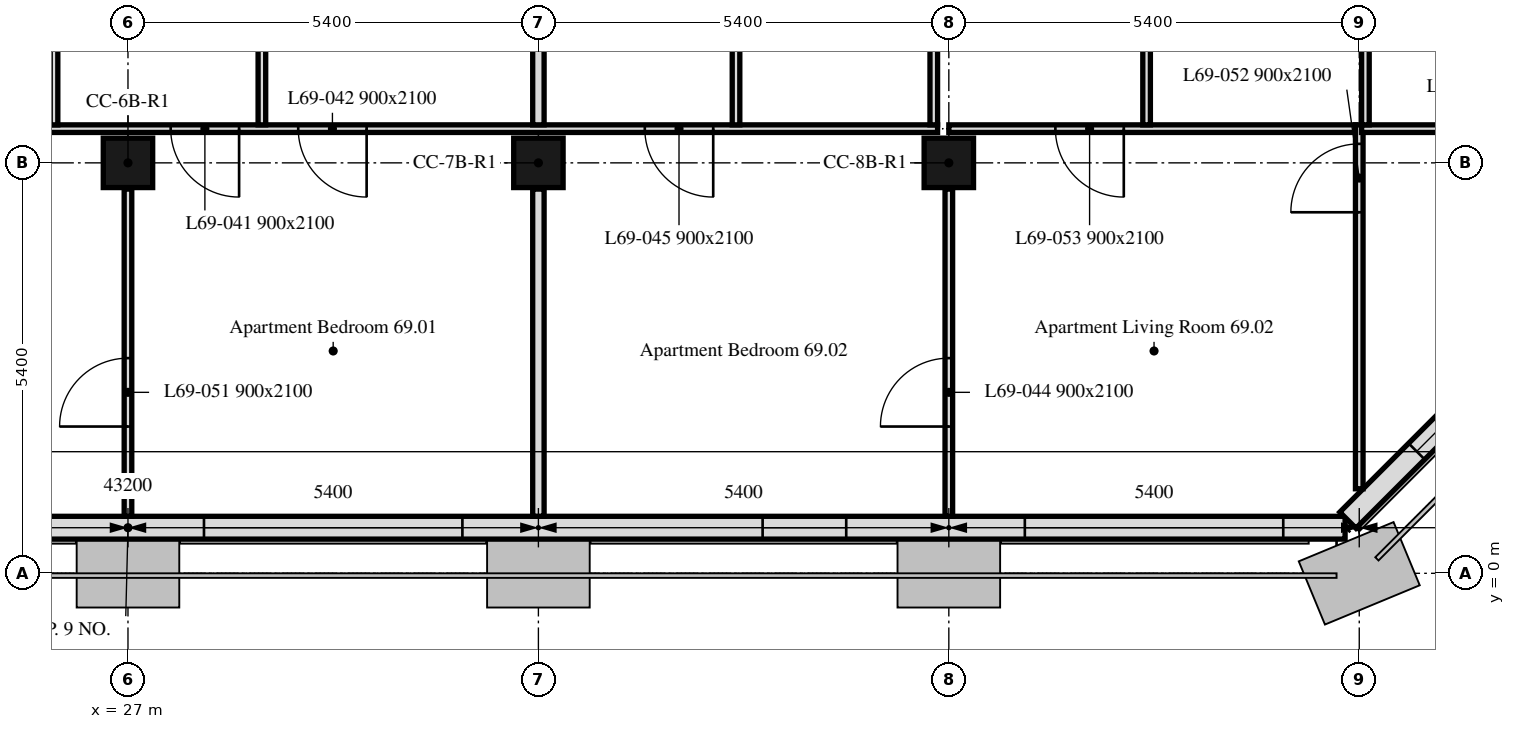
"""IFC4 building model, lengths in metres.
Left out: names, types, materials, properties, quantities, classifications, styles, units other than length and angle.
Written with IfcOpenShell. Run it as: python <this file> out.ifc"""

import sys

from ifc_helpers import new_model, si_unit, direction, frame, frame_2d, origin, origin_2d, place, context, subcontext, project, spatial, rectangle, extrude, element, fill, save


model = new_model("IFC4")
c1 = context("Model", 3, precision=1e-05, world=origin(), true_north=direction((0.0, 1.0)))
c2 = subcontext(c1, "Body", "Model", "MODEL_VIEW")
j1 = project(units=[si_unit("LENGTHUNIT", "METRE"), si_unit("PLANEANGLEUNIT", "RADIAN")], contexts=[c1])
p1 = place(None, origin())
s1 = spatial("IfcSite", under=j1, at=p1, CompositionType="ELEMENT")
p2 = place(p1, origin())
s2 = spatial("IfcBuilding", under=s1, at=p2, CompositionType="ELEMENT")
p3 = place(p2, frame((0.0, 0.0, 281.8)))
s3 = spatial("IfcBuildingStorey", under=s2, at=p3, CompositionType="ELEMENT", Elevation=281.8)
for number, where, z_axis, x_axis in (
    (1, (27.0, 5.4, 0.0), (0.0, 0.0, 1.0), (1.0, 0.0, 0.0)),
    (2, (32.4, 5.4, 0.0), (0.0, 0.0, 1.0), (1.0, 0.0, 0.0)),
    (3, (37.8, 5.4, 0.0), (0.0, 0.0, 1.0), (1.0, 0.0, 0.0)),
):
    element("IfcColumn", number, at=place(p3, frame(where, z_axis=z_axis, x_axis=x_axis)), inside=s3, PredefinedType="COLUMN", context=c2, shape_type="SweptSolid", body=[
        extrude(rectangle(XDim=0.65, YDim=0.65, at=origin_2d()), origin(), (0.0, 0.0, 1.0), 3.0),
    ])
p4 = place(p3, frame((10.986, 0.6, 0.0), z_axis=(0.0, 0.0, 1.0), x_axis=(1.0, 0.0, 0.0)))
e4 = element("IfcWall", 4, at=p4, inside=s3, PredefinedType="SOLIDWALL", context=c2, shape_type="SweptSolid", body=[
    extrude(rectangle(XDim=32.027, YDim=0.3, at=frame_2d((16.014, 0.0))), origin(), (0.0, 0.0, 1.0), 3.0),
])
p5 = place(p4, frame((2.764, 0.0, 0.9)))
e5 = element("IfcOpeningElement", 5, at=p5, cuts=e4, PredefinedType="OPENING", context=c2, shape_type="SweptSolid", body=[
    extrude(rectangle(XDim=1.1, YDim=1.7, at=frame_2d((0.55, 0.85))), frame((0.0, 0.16, 0.0), z_axis=(0.0, -1.0, 0.0), x_axis=(1.0, 0.0, 0.0)), (0.0, 0.0, 1.0), 0.32),
])
p6 = place(p4, frame((6.214, 0.0, 0.9)))
e6 = element("IfcOpeningElement", 6, at=p6, cuts=e4, PredefinedType="OPENING", context=c2, shape_type="SweptSolid", body=[
    extrude(rectangle(XDim=3.4, YDim=1.7, at=frame_2d((1.7, 0.85))), frame((0.0, 0.16, 0.0), z_axis=(0.0, -1.0, 0.0), x_axis=(1.0, 0.0, 0.0)), (0.0, 0.0, 1.0), 0.32),
])
p7 = place(p4, frame((13.564, 0.0, 0.9)))
e7 = element("IfcOpeningElement", 7, at=p7, cuts=e4, PredefinedType="OPENING", context=c2, shape_type="SweptSolid", body=[
    extrude(rectangle(XDim=1.1, YDim=1.7, at=frame_2d((0.55, 0.85))), frame((0.0, 0.16, 0.0), z_axis=(0.0, -1.0, 0.0), x_axis=(1.0, 0.0, 0.0)), (0.0, 0.0, 1.0), 0.32),
])
p8 = place(p4, frame((17.014, 0.0, 0.9)))
e8 = element("IfcOpeningElement", 8, at=p8, cuts=e4, PredefinedType="OPENING", context=c2, shape_type="SweptSolid", body=[
    extrude(rectangle(XDim=3.4, YDim=1.7, at=frame_2d((1.7, 0.85))), frame((0.0, 0.16, 0.0), z_axis=(0.0, -1.0, 0.0), x_axis=(1.0, 0.0, 0.0)), (0.0, 0.0, 1.0), 0.32),
])
p9 = place(p4, frame((24.364, 0.0, 0.9)))
e9 = element("IfcOpeningElement", 9, at=p9, cuts=e4, PredefinedType="OPENING", context=c2, shape_type="SweptSolid", body=[
    extrude(rectangle(XDim=1.1, YDim=1.7, at=frame_2d((0.55, 0.85))), frame((0.0, 0.16, 0.0), z_axis=(0.0, -1.0, 0.0), x_axis=(1.0, 0.0, 0.0)), (0.0, 0.0, 1.0), 0.32),
])
p10 = place(p4, frame((27.814, 0.0, 0.9)))
e10 = element("IfcOpeningElement", 10, at=p10, cuts=e4, PredefinedType="OPENING", context=c2, shape_type="SweptSolid", body=[
    extrude(rectangle(XDim=3.4, YDim=1.7, at=frame_2d((1.7, 0.85))), frame((0.0, 0.16, 0.0), z_axis=(0.0, -1.0, 0.0), x_axis=(1.0, 0.0, 0.0)), (0.0, 0.0, 1.0), 0.32),
])
p11 = place(p3, frame((43.051, 0.699, 0.0), z_axis=(0.0, 0.0, 1.0), x_axis=(0.707106781187, 0.707106781187, 0.0)))
e11 = element("IfcWall", 11, at=p11, inside=s3, PredefinedType="SOLIDWALL", context=c2, shape_type="SweptSolid", body=[
    extrude(rectangle(XDim=6.86, YDim=0.3, at=frame_2d((3.43, 0.0))), origin(), (0.0, 0.0, 1.0), 3.0),
])
p12 = place(p11, frame((1.28, 0.0, 0.9)))
e12 = element("IfcOpeningElement", 12, at=p12, cuts=e11, PredefinedType="OPENING", context=c2, shape_type="SweptSolid", body=[
    extrude(rectangle(XDim=1.1, YDim=1.7, at=frame_2d((0.55, 0.85))), frame((0.0, 0.16, 0.0), z_axis=(0.0, -1.0, 0.0), x_axis=(1.0, 0.0, 0.0)), (0.0, 0.0, 1.0), 0.32),
])
p13 = place(p11, frame((4.48, 0.0, 0.9)))
e13 = element("IfcOpeningElement", 13, at=p13, cuts=e11, PredefinedType="OPENING", context=c2, shape_type="SweptSolid", body=[
    extrude(rectangle(XDim=1.1, YDim=1.7, at=frame_2d((0.55, 0.85))), frame((0.0, 0.16, 0.0), z_axis=(0.0, -1.0, 0.0), x_axis=(1.0, 0.0, 0.0)), (0.0, 0.0, 1.0), 0.32),
])
p14 = place(p3, frame((37.652, 5.85, 0.0), z_axis=(0.0, 0.0, 1.0), x_axis=(-1.0, 0.0, 0.0)))
e14 = element("IfcWall", 14, at=p14, inside=s3, PredefinedType="PARTITIONING", context=c2, shape_type="SweptSolid", body=[
    extrude(rectangle(XDim=31.501, YDim=0.1, at=frame_2d((15.75, 0.0))), origin(), (0.0, 0.0, 1.0), 2.4),
])
p15 = place(p14, frame((12.923, 0.0, 0.0)))
e15 = element("IfcOpeningElement", 15, at=p15, cuts=e14, PredefinedType="OPENING", context=c2, shape_type="SweptSolid", body=[
    extrude(rectangle(XDim=0.9, YDim=2.1, at=frame_2d((0.45, 1.05))), frame((0.0, 0.05, 0.0), z_axis=(0.0, -1.0, 0.0), x_axis=(1.0, 0.0, 0.0)), (0.0, 0.0, 1.0), 0.1),
])
p16 = place(p14, frame((29.422, 0.0, 0.0)))
e16 = element("IfcOpeningElement", 16, at=p16, cuts=e14, PredefinedType="OPENING", context=c2, shape_type="SweptSolid", body=[
    extrude(rectangle(XDim=0.9, YDim=2.1, at=frame_2d((0.45, 1.05))), frame((0.0, 0.05, 0.0), z_axis=(0.0, -1.0, 0.0), x_axis=(1.0, 0.0, 0.0)), (0.0, 0.0, 1.0), 0.1),
])
p17 = place(p14, frame((28.182, 0.0, 0.0)))
e17 = element("IfcOpeningElement", 17, at=p17, cuts=e14, PredefinedType="OPENING", context=c2, shape_type="SweptSolid", body=[
    extrude(rectangle(XDim=0.9, YDim=2.1, at=frame_2d((0.45, 1.05))), frame((0.0, 0.05, 0.0), z_axis=(0.0, -1.0, 0.0), x_axis=(1.0, 0.0, 0.0)), (0.0, 0.0, 1.0), 0.1),
])
p18 = place(p14, frame((23.942, 0.0, 0.0)))
e18 = element("IfcOpeningElement", 18, at=p18, cuts=e14, PredefinedType="OPENING", context=c2, shape_type="SweptSolid", body=[
    extrude(rectangle(XDim=0.9, YDim=2.1, at=frame_2d((0.45, 1.05))), frame((0.0, 0.05, 0.0), z_axis=(0.0, -1.0, 0.0), x_axis=(1.0, 0.0, 0.0)), (0.0, 0.0, 1.0), 0.1),
])
p19 = place(p14, frame((22.572, 0.0, 0.0)))
e19 = element("IfcOpeningElement", 19, at=p19, cuts=e14, PredefinedType="OPENING", context=c2, shape_type="SweptSolid", body=[
    extrude(rectangle(XDim=0.9, YDim=2.1, at=frame_2d((0.45, 1.05))), frame((0.0, 0.05, 0.0), z_axis=(0.0, -1.0, 0.0), x_axis=(1.0, 0.0, 0.0)), (0.0, 0.0, 1.0), 0.1),
])
p20 = place(p14, frame((19.466, 0.0, 0.0)))
e20 = element("IfcOpeningElement", 20, at=p20, cuts=e14, PredefinedType="OPENING", context=c2, shape_type="SweptSolid", body=[
    extrude(rectangle(XDim=0.9, YDim=2.1, at=frame_2d((0.45, 1.05))), frame((0.0, 0.05, 0.0), z_axis=(0.0, -1.0, 0.0), x_axis=(1.0, 0.0, 0.0)), (0.0, 0.0, 1.0), 0.1),
])
p21 = place(p14, frame((9.19, 0.0, 0.0)))
e21 = element("IfcOpeningElement", 21, at=p21, cuts=e14, PredefinedType="OPENING", context=c2, shape_type="SweptSolid", body=[
    extrude(rectangle(XDim=0.9, YDim=2.1, at=frame_2d((0.45, 1.05))), frame((0.0, 0.05, 0.0), z_axis=(0.0, -1.0, 0.0), x_axis=(1.0, 0.0, 0.0)), (0.0, 0.0, 1.0), 0.1),
])
p22 = place(p14, frame((7.512, 0.0, 0.0)))
e22 = element("IfcOpeningElement", 22, at=p22, cuts=e14, PredefinedType="OPENING", context=c2, shape_type="SweptSolid", body=[
    extrude(rectangle(XDim=0.9, YDim=2.1, at=frame_2d((0.45, 1.05))), frame((0.0, 0.05, 0.0), z_axis=(0.0, -1.0, 0.0), x_axis=(1.0, 0.0, 0.0)), (0.0, 0.0, 1.0), 0.1),
])
p23 = place(p14, frame((2.952, 0.0, 0.0)))
e23 = element("IfcOpeningElement", 23, at=p23, cuts=e14, PredefinedType="OPENING", context=c2, shape_type="SweptSolid", body=[
    extrude(rectangle(XDim=0.9, YDim=2.1, at=frame_2d((0.45, 1.05))), frame((0.0, 0.05, 0.0), z_axis=(0.0, -1.0, 0.0), x_axis=(1.0, 0.0, 0.0)), (0.0, 0.0, 1.0), 0.1),
])
p24 = place(p14, frame((18.096, 0.0, 0.0)))
e24 = element("IfcOpeningElement", 24, at=p24, cuts=e14, PredefinedType="OPENING", context=c2, shape_type="SweptSolid", body=[
    extrude(rectangle(XDim=0.9, YDim=2.1, at=frame_2d((0.45, 1.05))), frame((0.0, 0.05, 0.0), z_axis=(0.0, -1.0, 0.0), x_axis=(1.0, 0.0, 0.0)), (0.0, 0.0, 1.0), 0.1),
])
p25 = place(p3, frame((27.0, 0.751, 0.0), z_axis=(0.0, 0.0, 1.0), x_axis=(0.0, 1.0, 0.0)))
e25 = element("IfcWall", 25, at=p25, inside=s3, PredefinedType="PARTITIONING", context=c2, shape_type="SweptSolid", body=[
    extrude(rectangle(XDim=4.304, YDim=0.1, at=frame_2d((2.152, 0.0))), origin(), (0.0, 0.0, 1.0), 2.4),
])
p26 = place(p25, frame((1.18, 0.0, 0.0)))
e26 = element("IfcOpeningElement", 26, at=p26, cuts=e25, PredefinedType="OPENING", context=c2, shape_type="SweptSolid", body=[
    extrude(rectangle(XDim=0.9, YDim=2.1, at=frame_2d((0.45, 1.05))), frame((0.0, 0.05, 0.0), z_axis=(0.0, -1.0, 0.0), x_axis=(1.0, 0.0, 0.0)), (0.0, 0.0, 1.0), 0.1),
])
p27 = place(p3, frame((32.4, 0.751, 0.0), z_axis=(0.0, 0.0, 1.0), x_axis=(0.0, 1.0, 0.0)))
e27 = element("IfcWall", 27, at=p27, inside=s3, PredefinedType="PARTITIONING", context=c2, shape_type="SweptSolid", body=[
    extrude(rectangle(XDim=4.304, YDim=0.15, at=frame_2d((2.152, 0.0))), origin(), (0.0, 0.0, 1.0), 2.4),
])
for number, where, z_axis, x_axis in (
    (28, (26.027, 5.9, 0.0), (0.0, 0.0, 1.0), (0.0, 1.0, 0.0)),
    (29, (28.762, 5.9, 0.0), (0.0, 0.0, 1.0), (0.0, 1.0, 0.0)),
):
    element("IfcWall", number, at=place(p3, frame(where, z_axis=z_axis, x_axis=x_axis)), inside=s3, PredefinedType="PARTITIONING", context=c2, shape_type="SweptSolid", body=[
        extrude(rectangle(XDim=7.975, YDim=0.1, at=frame_2d((3.988, 0.0))), origin(), (0.0, 0.0, 1.0), 3.0),
    ])
p28 = place(p3, frame((32.4, 5.9, 0.0), z_axis=(0.0, 0.0, 1.0), x_axis=(0.0, 1.0, 0.0)))
e30 = element("IfcWall", 30, at=p28, inside=s3, PredefinedType="PARTITIONING", context=c2, shape_type="SweptSolid", body=[
    extrude(rectangle(XDim=4.555, YDim=0.15, at=frame_2d((2.278, 0.0))), origin(), (0.0, 0.0, 1.0), 2.4),
])
p29 = place(p3, frame((37.8, 0.751, 0.0), z_axis=(0.0, 0.0, 1.0), x_axis=(0.0, 1.0, 0.0)))
e31 = element("IfcWall", 31, at=p29, inside=s3, PredefinedType="PARTITIONING", context=c2, shape_type="SweptSolid", body=[
    extrude(rectangle(XDim=4.304, YDim=0.1, at=frame_2d((2.152, 0.0))), origin(), (0.0, 0.0, 1.0), 2.4),
])
p30 = place(p29, frame((1.18, 0.0, 0.0)))
e32 = element("IfcOpeningElement", 32, at=p30, cuts=e31, PredefinedType="OPENING", context=c2, shape_type="SweptSolid", body=[
    extrude(rectangle(XDim=0.9, YDim=2.1, at=frame_2d((0.45, 1.05))), frame((0.0, 0.05, 0.0), z_axis=(0.0, -1.0, 0.0), x_axis=(1.0, 0.0, 0.0)), (0.0, 0.0, 1.0), 0.1),
])
p31 = place(p3, frame((43.2, 1.112, 0.0), z_axis=(0.0, 0.0, 1.0), x_axis=(0.0, 1.0, 0.0)))
e33 = element("IfcWall", 33, at=p31, inside=s3, PredefinedType="PARTITIONING", context=c2, shape_type="SweptSolid", body=[
    extrude(rectangle(XDim=4.788, YDim=0.1, at=frame_2d((2.394, 0.0))), origin(), (0.0, 0.0, 1.0), 3.0),
])
p32 = place(p31, frame((3.638, 0.0, 0.0)))
e34 = element("IfcOpeningElement", 34, at=p32, cuts=e33, PredefinedType="OPENING", context=c2, shape_type="SweptSolid", body=[
    extrude(rectangle(XDim=0.9, YDim=2.1, at=frame_2d((0.45, 1.05))), frame((0.0, 0.05, 0.0), z_axis=(0.0, -1.0, 0.0), x_axis=(1.0, 0.0, 0.0)), (0.0, 0.0, 1.0), 0.1),
])
p33 = place(p3, frame((43.15, 5.85, 0.0), z_axis=(0.0, 0.0, 1.0), x_axis=(-1.0, 0.0, 0.0)))
e35 = element("IfcWall", 35, at=p33, inside=s3, PredefinedType="PARTITIONING", context=c2, shape_type="SweptSolid", body=[
    extrude(rectangle(XDim=5.35, YDim=0.1, at=frame_2d((2.675, 0.0))), origin(), (0.0, 0.0, 1.0), 3.0),
])
p34 = place(p33, frame((3.048, 0.0, 0.0)))
e36 = element("IfcOpeningElement", 36, at=p34, cuts=e35, PredefinedType="OPENING", context=c2, shape_type="SweptSolid", body=[
    extrude(rectangle(XDim=0.9, YDim=2.1, at=frame_2d((0.45, 1.05))), frame((0.0, 0.05, 0.0), z_axis=(0.0, -1.0, 0.0), x_axis=(1.0, 0.0, 0.0)), (0.0, 0.0, 1.0), 0.1),
])
p35 = place(p3, frame((47.849, 5.85, 0.0), z_axis=(0.0, 0.0, 1.0), x_axis=(-1.0, 0.0, 0.0)))
e37 = element("IfcWall", 37, at=p35, inside=s3, PredefinedType="PARTITIONING", context=c2, shape_type="SweptSolid", body=[
    extrude(rectangle(XDim=4.618, YDim=0.1, at=frame_2d((2.309, 0.0))), origin(), (0.0, 0.0, 1.0), 3.0),
])
p36 = place(p35, frame((2.333, 0.0, 0.0)))
e38 = element("IfcOpeningElement", 38, at=p36, cuts=e37, PredefinedType="OPENING", context=c2, shape_type="SweptSolid", body=[
    extrude(rectangle(XDim=0.9, YDim=2.1, at=frame_2d((0.45, 1.05))), frame((0.0, 0.05, 0.0), z_axis=(0.0, -1.0, 0.0), x_axis=(1.0, 0.0, 0.0)), (0.0, 0.0, 1.0), 0.1),
])
p37 = place(p3, frame((35.0, 5.9, 0.0), z_axis=(0.0, 0.0, 1.0), x_axis=(0.0, 1.0, 0.0)))
e39 = element("IfcWall", 39, at=p37, inside=s3, PredefinedType="PARTITIONING", context=c2, shape_type="SweptSolid", body=[
    extrude(rectangle(XDim=7.975, YDim=0.1, at=frame_2d((3.988, 0.0))), origin(), (0.0, 0.0, 1.0), 2.4),
])
p38 = place(p3, frame((37.602, 5.9, 0.0), z_axis=(0.0, 0.0, 1.0), x_axis=(0.0, 1.0, 0.0)))
e40 = element("IfcWall", 40, at=p38, inside=s3, PredefinedType="PARTITIONING", context=c2, shape_type="SweptSolid", body=[
    extrude(rectangle(XDim=4.555, YDim=0.1, at=frame_2d((2.278, 0.0))), origin(), (0.0, 0.0, 1.0), 2.4),
])
p39 = place(p38, frame((1.787, 0.0, 0.0)))
e41 = element("IfcOpeningElement", 41, at=p39, cuts=e40, PredefinedType="OPENING", context=c2, shape_type="SweptSolid", body=[
    extrude(rectangle(XDim=0.9, YDim=2.1, at=frame_2d((0.45, 1.05))), frame((0.0, 0.05, 0.0), z_axis=(0.0, -1.0, 0.0), x_axis=(1.0, 0.0, 0.0)), (0.0, 0.0, 1.0), 0.1),
])
p40 = place(p3, frame((40.402, 5.9, 0.0), z_axis=(0.0, 0.0, 1.0), x_axis=(0.0, 1.0, 0.0)))
e42 = element("IfcWall", 42, at=p40, inside=s3, PredefinedType="PARTITIONING", context=c2, shape_type="SweptSolid", body=[
    extrude(rectangle(XDim=7.975, YDim=0.1, at=frame_2d((3.988, 0.0))), origin(), (0.0, 0.0, 1.0), 2.4),
])
p41 = place(p40, frame((2.3, 0.0, 0.0)))
e43 = element("IfcOpeningElement", 43, at=p41, cuts=e42, PredefinedType="OPENING", context=c2, shape_type="SweptSolid", body=[
    extrude(rectangle(XDim=0.9, YDim=2.1, at=frame_2d((0.45, 1.05))), frame((0.0, 0.05, 0.0), z_axis=(0.0, -1.0, 0.0), x_axis=(1.0, 0.0, 0.0)), (0.0, 0.0, 1.0), 0.1),
])
p42 = place(p40, frame((6.35, 0.0, 0.0)))
e44 = element("IfcOpeningElement", 44, at=p42, cuts=e42, PredefinedType="OPENING", context=c2, shape_type="SweptSolid", body=[
    extrude(rectangle(XDim=0.9, YDim=2.1, at=frame_2d((0.45, 1.05))), frame((0.0, 0.05, 0.0), z_axis=(0.0, -1.0, 0.0), x_axis=(1.0, 0.0, 0.0)), (0.0, 0.0, 1.0), 0.1),
])
p43 = place(p3, frame((43.281, 5.9, 0.0), z_axis=(0.0, 0.0, 1.0), x_axis=(0.0, 1.0, 0.0)))
e45 = element("IfcWall", 45, at=p43, inside=s3, PredefinedType="PARTITIONING", context=c2, shape_type="SweptSolid", body=[
    extrude(rectangle(XDim=4.555, YDim=0.1, at=frame_2d((2.278, 0.0))), origin(), (0.0, 0.0, 1.0), 3.0),
])
p44 = place(p8, origin())
e46 = element("IfcWindow", 46, at=p44, inside=s3, PartitioningType="SINGLE_PANEL", PredefinedType="WINDOW", context=c2, shape_type="SweptSolid", body=[
    extrude(rectangle(XDim=3.4, YDim=1.7, at=frame_2d((1.7, 0.85))), frame((0.0, 0.03, 0.0), z_axis=(0.0, -1.0, 0.0), x_axis=(1.0, 0.0, 0.0)), (0.0, 0.0, 1.0), 0.06),
])
fill(e8, e46)
p45 = place(p9, origin())
e47 = element("IfcWindow", 47, at=p45, inside=s3, PartitioningType="SINGLE_PANEL", PredefinedType="WINDOW", context=c2, shape_type="SweptSolid", body=[
    extrude(rectangle(XDim=1.1, YDim=1.7, at=frame_2d((0.55, 0.85))), frame((0.0, 0.03, 0.0), z_axis=(0.0, -1.0, 0.0), x_axis=(1.0, 0.0, 0.0)), (0.0, 0.0, 1.0), 0.06),
])
fill(e9, e47)
p46 = place(p10, origin())
e48 = element("IfcWindow", 48, at=p46, inside=s3, PartitioningType="SINGLE_PANEL", PredefinedType="WINDOW", context=c2, shape_type="SweptSolid", body=[
    extrude(rectangle(XDim=3.4, YDim=1.7, at=frame_2d((1.7, 0.85))), frame((0.0, 0.03, 0.0), z_axis=(0.0, -1.0, 0.0), x_axis=(1.0, 0.0, 0.0)), (0.0, 0.0, 1.0), 0.06),
])
fill(e10, e48)
p47 = place(p12, origin())
e49 = element("IfcWindow", 49, at=p47, inside=s3, PartitioningType="SINGLE_PANEL", PredefinedType="WINDOW", context=c2, shape_type="SweptSolid", body=[
    extrude(rectangle(XDim=1.1, YDim=1.7, at=frame_2d((0.55, 0.85))), frame((0.0, 0.03, 0.0), z_axis=(0.0, -1.0, 0.0), x_axis=(1.0, 0.0, 0.0)), (0.0, 0.0, 1.0), 0.06),
])
fill(e12, e49)
p48 = place(p21, origin())
e50 = element("IfcDoor", 50, at=p48, inside=s3, OperationType="SINGLE_SWING_LEFT", PredefinedType="DOOR", context=c2, shape_type="SweptSolid", body=[
    extrude(rectangle(XDim=0.9, YDim=2.1, at=frame_2d((0.45, 1.05))), frame((0.0, 0.025, 0.0), z_axis=(0.0, -1.0, 0.0), x_axis=(1.0, 0.0, 0.0)), (0.0, 0.0, 1.0), 0.05),
])
fill(e21, e50)
p49 = place(p22, origin())
e51 = element("IfcDoor", 51, at=p49, inside=s3, OperationType="SINGLE_SWING_RIGHT", PredefinedType="DOOR", context=c2, shape_type="SweptSolid", body=[
    extrude(rectangle(XDim=0.9, YDim=2.1, at=frame_2d((0.45, 1.05))), frame((0.0, 0.025, 0.0), z_axis=(0.0, -1.0, 0.0), x_axis=(1.0, 0.0, 0.0)), (0.0, 0.0, 1.0), 0.05),
])
fill(e22, e51)
p50 = place(p30, origin())
e52 = element("IfcDoor", 52, at=p50, inside=s3, OperationType="SINGLE_SWING_RIGHT", PredefinedType="DOOR", context=c2, shape_type="SweptSolid", body=[
    extrude(rectangle(XDim=0.9, YDim=2.1, at=frame_2d((0.45, 1.05))), frame((0.0, 0.025, 0.0), z_axis=(0.0, -1.0, 0.0), x_axis=(1.0, 0.0, 0.0)), (0.0, 0.0, 1.0), 0.05),
])
fill(e32, e52)
p51 = place(p23, origin())
e53 = element("IfcDoor", 53, at=p51, inside=s3, OperationType="SINGLE_SWING_RIGHT", PredefinedType="DOOR", context=c2, shape_type="SweptSolid", body=[
    extrude(rectangle(XDim=0.9, YDim=2.1, at=frame_2d((0.45, 1.05))), frame((0.0, 0.025, 0.0), z_axis=(0.0, -1.0, 0.0), x_axis=(1.0, 0.0, 0.0)), (0.0, 0.0, 1.0), 0.05),
])
fill(e23, e53)
p52 = place(p26, origin())
e54 = element("IfcDoor", 54, at=p52, inside=s3, OperationType="SINGLE_SWING_RIGHT", PredefinedType="DOOR", context=c2, shape_type="SweptSolid", body=[
    extrude(rectangle(XDim=0.9, YDim=2.1, at=frame_2d((0.45, 1.05))), frame((0.0, 0.025, 0.0), z_axis=(0.0, -1.0, 0.0), x_axis=(1.0, 0.0, 0.0)), (0.0, 0.0, 1.0), 0.05),
])
fill(e26, e54)
p53 = place(p32, origin())
e55 = element("IfcDoor", 55, at=p53, inside=s3, OperationType="SINGLE_SWING_LEFT", PredefinedType="DOOR", context=c2, shape_type="SweptSolid", body=[
    extrude(rectangle(XDim=0.9, YDim=2.1, at=frame_2d((0.45, 1.05))), frame((0.0, 0.025, 0.0), z_axis=(0.0, -1.0, 0.0), x_axis=(1.0, 0.0, 0.0)), (0.0, 0.0, 1.0), 0.05),
])
fill(e34, e55)
p54 = place(p34, origin())
e56 = element("IfcDoor", 56, at=p54, inside=s3, OperationType="SINGLE_SWING_RIGHT", PredefinedType="DOOR", context=c2, shape_type="SweptSolid", body=[
    extrude(rectangle(XDim=0.9, YDim=2.1, at=frame_2d((0.45, 1.05))), frame((0.0, 0.025, 0.0), z_axis=(0.0, -1.0, 0.0), x_axis=(1.0, 0.0, 0.0)), (0.0, 0.0, 1.0), 0.05),
])
fill(e36, e56)
save(model, sys.argv[1])
